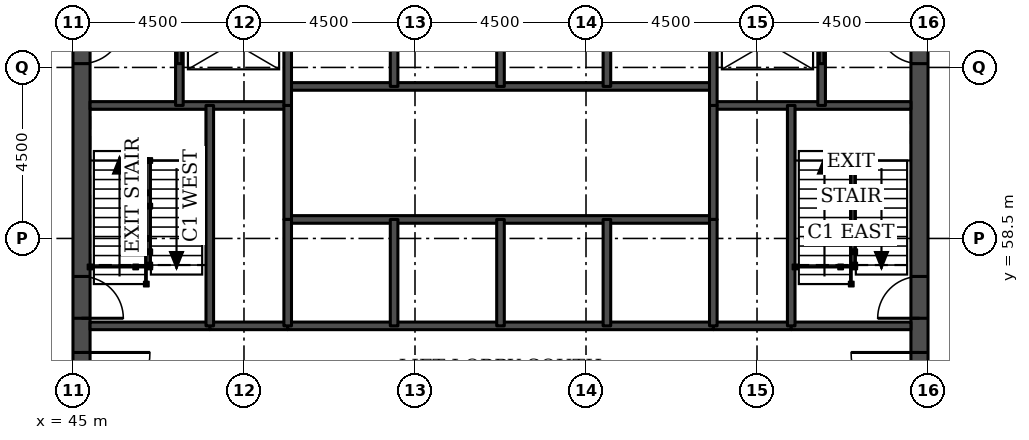
"""IFC4 building model, lengths in metres.
Left out: names, types, materials, properties, quantities, classifications, styles, units other than length and angle.
Written with IfcOpenShell. Run it as: python <this file> out.ifc"""

import sys

from ifc_helpers import new_model, si_unit, direction, frame, frame_2d, origin, place, context, subcontext, project, spatial, rectangle, extrude, element, fill, save


model = new_model("IFC4")
c1 = context("Model", 3, precision=1e-05, world=origin(), true_north=direction((0.0, 1.0)))
c2 = subcontext(c1, "Body", "Model", "MODEL_VIEW")
j1 = project(units=[si_unit("LENGTHUNIT", "METRE"), si_unit("PLANEANGLEUNIT", "RADIAN")], contexts=[c1])
p1 = place(None, origin())
s1 = spatial("IfcSite", under=j1, at=p1, CompositionType="ELEMENT")
p2 = place(p1, origin())
s2 = spatial("IfcBuilding", under=s1, at=p2, CompositionType="ELEMENT")
p3 = place(p2, frame((0.0, 0.0, 108.5)))
s3 = spatial("IfcBuildingStorey", under=s2, at=p3, CompositionType="ELEMENT", Elevation=108.5)
p4 = place(p3, frame((45.225, 49.5, 0.0), z_axis=(0.0, 0.0, 1.0), x_axis=(0.0, 1.0, 0.0)))
e1 = element("IfcWall", 1, at=p4, inside=s3, PredefinedType="SHEAR", context=c2, shape_type="SweptSolid", body=[
    extrude(rectangle(XDim=22.5, YDim=0.45, at=frame_2d((11.25, 0.0))), origin(), (0.0, 0.0, 1.0), 3.7),
])
p5 = place(p4, frame((4.2, 0.0, 0.0)))
e2 = element("IfcOpeningElement", 2, at=p5, cuts=e1, PredefinedType="OPENING", context=c2, shape_type="SweptSolid", body=[
    extrude(rectangle(XDim=1.8, YDim=2.1, at=frame_2d((0.9, 1.05))), frame((0.0, 0.235, 0.0), z_axis=(0.0, -1.0, 0.0), x_axis=(1.0, 0.0, 0.0)), (0.0, 0.0, 1.0), 0.47),
])
p6 = place(p4, frame((6.9, 0.0, 0.0)))
e3 = element("IfcOpeningElement", 3, at=p6, cuts=e1, PredefinedType="OPENING", context=c2, shape_type="SweptSolid", body=[
    extrude(rectangle(XDim=1.1, YDim=2.1, at=frame_2d((0.55, 1.05))), frame((0.0, 0.235, 0.0), z_axis=(0.0, -1.0, 0.0), x_axis=(1.0, 0.0, 0.0)), (0.0, 0.0, 1.0), 0.47),
])
p7 = place(p4, frame((13.6, 0.0, 0.0)))
e4 = element("IfcOpeningElement", 4, at=p7, cuts=e1, PredefinedType="OPENING", context=c2, shape_type="SweptSolid", body=[
    extrude(rectangle(XDim=1.1, YDim=2.1, at=frame_2d((0.55, 1.05))), frame((0.0, 0.235, 0.0), z_axis=(0.0, -1.0, 0.0), x_axis=(1.0, 0.0, 0.0)), (0.0, 0.0, 1.0), 0.47),
])
p8 = place(p4, frame((16.5, 0.0, 0.0)))
e5 = element("IfcOpeningElement", 5, at=p8, cuts=e1, PredefinedType="OPENING", context=c2, shape_type="SweptSolid", body=[
    extrude(rectangle(XDim=1.8, YDim=2.1, at=frame_2d((0.9, 1.05))), frame((0.0, 0.235, 0.0), z_axis=(0.0, -1.0, 0.0), x_axis=(1.0, 0.0, 0.0)), (0.0, 0.0, 1.0), 0.47),
])
p9 = place(p3, frame((67.275, 49.5, 0.0), z_axis=(0.0, 0.0, 1.0), x_axis=(0.0, 1.0, 0.0)))
e6 = element("IfcWall", 6, at=p9, inside=s3, PredefinedType="SHEAR", context=c2, shape_type="SweptSolid", body=[
    extrude(rectangle(XDim=22.5, YDim=0.45, at=frame_2d((11.25, 0.0))), origin(), (0.0, 0.0, 1.0), 3.7),
])
p10 = place(p9, frame((4.2, 0.0, 0.0)))
e7 = element("IfcOpeningElement", 7, at=p10, cuts=e6, PredefinedType="OPENING", context=c2, shape_type="SweptSolid", body=[
    extrude(rectangle(XDim=1.8, YDim=2.1, at=frame_2d((0.9, 1.05))), frame((0.0, 0.235, 0.0), z_axis=(0.0, -1.0, 0.0), x_axis=(1.0, 0.0, 0.0)), (0.0, 0.0, 1.0), 0.47),
])
p11 = place(p9, frame((6.9, 0.0, 0.0)))
e8 = element("IfcOpeningElement", 8, at=p11, cuts=e6, PredefinedType="OPENING", context=c2, shape_type="SweptSolid", body=[
    extrude(rectangle(XDim=1.1, YDim=2.1, at=frame_2d((0.55, 1.05))), frame((0.0, 0.235, 0.0), z_axis=(0.0, -1.0, 0.0), x_axis=(1.0, 0.0, 0.0)), (0.0, 0.0, 1.0), 0.47),
])
p12 = place(p9, frame((13.6, 0.0, 0.0)))
e9 = element("IfcOpeningElement", 9, at=p12, cuts=e6, PredefinedType="OPENING", context=c2, shape_type="SweptSolid", body=[
    extrude(rectangle(XDim=1.1, YDim=2.1, at=frame_2d((0.55, 1.05))), frame((0.0, 0.235, 0.0), z_axis=(0.0, -1.0, 0.0), x_axis=(1.0, 0.0, 0.0)), (0.0, 0.0, 1.0), 0.47),
])
p13 = place(p9, frame((16.5, 0.0, 0.0)))
e10 = element("IfcOpeningElement", 10, at=p13, cuts=e6, PredefinedType="OPENING", context=c2, shape_type="SweptSolid", body=[
    extrude(rectangle(XDim=1.8, YDim=2.1, at=frame_2d((0.9, 1.05))), frame((0.0, 0.235, 0.0), z_axis=(0.0, -1.0, 0.0), x_axis=(1.0, 0.0, 0.0)), (0.0, 0.0, 1.0), 0.47),
])
for number, where, z_axis, x_axis in (
    (11, (48.6, 56.2, 0.0), (0.0, 0.0, 1.0), (1.0, 0.0, 0.0)),
    (12, (61.85, 56.2, 0.0), (0.0, 0.0, 1.0), (1.0, 0.0, 0.0)),
):
    element("IfcWall", number, at=place(p3, frame(where, z_axis=z_axis, x_axis=x_axis)), inside=s3, PredefinedType="SOLIDWALL", context=c2, shape_type="SweptSolid", body=[
        extrude(rectangle(XDim=2.05, YDim=0.2, at=frame_2d((1.025, 0.0))), origin(), (0.0, 0.0, 1.0), 3.55),
    ])
p14 = place(p3, frame((45.45, 56.2, 0.0), z_axis=(0.0, 0.0, 1.0), x_axis=(1.0, 0.0, 0.0)))
e13 = element("IfcWall", 13, at=p14, inside=s3, PredefinedType="SOLIDWALL", context=c2, shape_type="SweptSolid", body=[
    extrude(rectangle(XDim=3.15, YDim=0.2, at=frame_2d((1.575, 0.0))), origin(), (0.0, 0.0, 1.0), 3.55),
])
p15 = place(p3, frame((50.65, 56.2, 0.0), z_axis=(0.0, 0.0, 1.0), x_axis=(1.0, 0.0, 0.0)))
e14 = element("IfcWall", 14, at=p15, inside=s3, PredefinedType="SOLIDWALL", context=c2, shape_type="SweptSolid", body=[
    extrude(rectangle(XDim=11.2, YDim=0.2, at=frame_2d((5.6, 0.0))), origin(), (0.0, 0.0, 1.0), 3.55),
])
p16 = place(p3, frame((63.9, 56.2, 0.0), z_axis=(0.0, 0.0, 1.0), x_axis=(1.0, 0.0, 0.0)))
e15 = element("IfcWall", 15, at=p16, inside=s3, PredefinedType="SOLIDWALL", context=c2, shape_type="SweptSolid", body=[
    extrude(rectangle(XDim=3.15, YDim=0.2, at=frame_2d((1.575, 0.0))), origin(), (0.0, 0.0, 1.0), 3.55),
])
p17 = place(p3, frame((50.65, 59.0, 0.0), z_axis=(0.0, 0.0, 1.0), x_axis=(1.0, 0.0, 0.0)))
e16 = element("IfcWall", 16, at=p17, inside=s3, PredefinedType="SOLIDWALL", context=c2, shape_type="SweptSolid", body=[
    extrude(rectangle(XDim=11.2, YDim=0.2, at=frame_2d((5.6, 0.0))), origin(), (0.0, 0.0, 1.0), 3.7),
])
for number, where, z_axis, x_axis in (
    (17, (45.45, 62.0, 0.0), (0.0, 0.0, 1.0), (1.0, 0.0, 0.0)),
    (18, (61.85, 62.0, 0.0), (0.0, 0.0, 1.0), (1.0, 0.0, 0.0)),
):
    element("IfcWall", number, at=place(p3, frame(where, z_axis=z_axis, x_axis=x_axis)), inside=s3, PredefinedType="SOLIDWALL", context=c2, shape_type="SweptSolid", body=[
        extrude(rectangle(XDim=5.2, YDim=0.2, at=frame_2d((2.6, 0.0))), origin(), (0.0, 0.0, 1.0), 3.55),
    ])
p18 = place(p3, frame((50.65, 62.5, 0.0), z_axis=(0.0, 0.0, 1.0), x_axis=(1.0, 0.0, 0.0)))
e19 = element("IfcWall", 19, at=p18, inside=s3, PredefinedType="SOLIDWALL", context=c2, shape_type="SweptSolid", body=[
    extrude(rectangle(XDim=11.2, YDim=0.2, at=frame_2d((5.6, 0.0))), origin(), (0.0, 0.0, 1.0), 3.7),
])
p19 = place(p3, frame((47.8, 62.0, 0.0), z_axis=(0.0, 0.0, 1.0), x_axis=(0.0, 1.0, 0.0)))
e20 = element("IfcWall", 20, at=p19, inside=s3, PredefinedType="SOLIDWALL", context=c2, shape_type="SweptSolid", body=[
    extrude(rectangle(XDim=3.3, YDim=0.2, at=frame_2d((1.65, 0.0))), origin(), (0.0, 0.0, 1.0), 3.55),
])
p20 = place(p19, frame((1.1, 0.0, 0.0)))
e21 = element("IfcOpeningElement", 21, at=p20, cuts=e20, PredefinedType="OPENING", context=c2, shape_type="SweptSolid", body=[
    extrude(rectangle(XDim=1.1, YDim=2.1, at=frame_2d((0.55, 1.05))), frame((0.0, 0.11, 0.0), z_axis=(0.0, -1.0, 0.0), x_axis=(1.0, 0.0, 0.0)), (0.0, 0.0, 1.0), 0.22),
])
p21 = place(p3, frame((48.6, 56.2, 0.0), z_axis=(0.0, 0.0, 1.0), x_axis=(0.0, 1.0, 0.0)))
e22 = element("IfcWall", 22, at=p21, inside=s3, PredefinedType="SOLIDWALL", context=c2, shape_type="SweptSolid", body=[
    extrude(rectangle(XDim=5.8, YDim=0.2, at=frame_2d((2.9, 0.0))), origin(), (0.0, 0.0, 1.0), 3.55),
])
p22 = place(p3, frame((50.65, 59.0, 0.0), z_axis=(0.0, 0.0, 1.0), x_axis=(0.0, 1.0, 0.0)))
e23 = element("IfcWall", 23, at=p22, inside=s3, PredefinedType="SOLIDWALL", context=c2, shape_type="SweptSolid", body=[
    extrude(rectangle(XDim=3.0, YDim=0.2, at=frame_2d((1.5, 0.0))), origin(), (0.0, 0.0, 1.0), 3.7),
])
p23 = place(p3, frame((50.65, 56.2, 0.0), z_axis=(0.0, 0.0, 1.0), x_axis=(0.0, 1.0, 0.0)))
e24 = element("IfcWall", 24, at=p23, inside=s3, PredefinedType="SOLIDWALL", context=c2, shape_type="SweptSolid", body=[
    extrude(rectangle(XDim=2.8, YDim=0.2, at=frame_2d((1.4, 0.0))), origin(), (0.0, 0.0, 1.0), 3.55),
])
p24 = place(p3, frame((50.65, 62.0, 0.0), z_axis=(0.0, 0.0, 1.0), x_axis=(0.0, 1.0, 0.0)))
e25 = element("IfcWall", 25, at=p24, inside=s3, PredefinedType="SOLIDWALL", context=c2, shape_type="SweptSolid", body=[
    extrude(rectangle(XDim=3.3, YDim=0.2, at=frame_2d((1.65, 0.0))), origin(), (0.0, 0.0, 1.0), 3.55),
])
for number, where, z_axis, x_axis in (
    (26, (53.45, 56.2, 0.0), (0.0, 0.0, 1.0), (0.0, 1.0, 0.0)),
    (27, (53.45, 62.5, 0.0), (0.0, 0.0, 1.0), (0.0, 1.0, 0.0)),
    (28, (56.25, 56.2, 0.0), (0.0, 0.0, 1.0), (0.0, 1.0, 0.0)),
    (29, (56.25, 62.5, 0.0), (0.0, 0.0, 1.0), (0.0, 1.0, 0.0)),
    (30, (59.05, 56.2, 0.0), (0.0, 0.0, 1.0), (0.0, 1.0, 0.0)),
    (31, (59.05, 62.5, 0.0), (0.0, 0.0, 1.0), (0.0, 1.0, 0.0)),
):
    element("IfcWall", number, at=place(p3, frame(where, z_axis=z_axis, x_axis=x_axis)), inside=s3, PredefinedType="SOLIDWALL", context=c2, shape_type="SweptSolid", body=[
        extrude(rectangle(XDim=2.8, YDim=0.2, at=frame_2d((1.4, 0.0))), origin(), (0.0, 0.0, 1.0), 3.55),
    ])
p25 = place(p3, frame((61.85, 59.0, 0.0), z_axis=(0.0, 0.0, 1.0), x_axis=(0.0, 1.0, 0.0)))
e32 = element("IfcWall", 32, at=p25, inside=s3, PredefinedType="SOLIDWALL", context=c2, shape_type="SweptSolid", body=[
    extrude(rectangle(XDim=3.0, YDim=0.2, at=frame_2d((1.5, 0.0))), origin(), (0.0, 0.0, 1.0), 3.7),
])
p26 = place(p3, frame((61.85, 56.2, 0.0), z_axis=(0.0, 0.0, 1.0), x_axis=(0.0, 1.0, 0.0)))
e33 = element("IfcWall", 33, at=p26, inside=s3, PredefinedType="SOLIDWALL", context=c2, shape_type="SweptSolid", body=[
    extrude(rectangle(XDim=2.8, YDim=0.2, at=frame_2d((1.4, 0.0))), origin(), (0.0, 0.0, 1.0), 3.55),
])
p27 = place(p3, frame((61.85, 62.0, 0.0), z_axis=(0.0, 0.0, 1.0), x_axis=(0.0, 1.0, 0.0)))
e34 = element("IfcWall", 34, at=p27, inside=s3, PredefinedType="SOLIDWALL", context=c2, shape_type="SweptSolid", body=[
    extrude(rectangle(XDim=3.3, YDim=0.2, at=frame_2d((1.65, 0.0))), origin(), (0.0, 0.0, 1.0), 3.55),
])
p28 = place(p3, frame((63.9, 56.2, 0.0), z_axis=(0.0, 0.0, 1.0), x_axis=(0.0, 1.0, 0.0)))
e35 = element("IfcWall", 35, at=p28, inside=s3, PredefinedType="SOLIDWALL", context=c2, shape_type="SweptSolid", body=[
    extrude(rectangle(XDim=5.8, YDim=0.2, at=frame_2d((2.9, 0.0))), origin(), (0.0, 0.0, 1.0), 3.55),
])
p29 = place(p3, frame((64.7, 62.0, 0.0), z_axis=(0.0, 0.0, 1.0), x_axis=(0.0, 1.0, 0.0)))
e36 = element("IfcWall", 36, at=p29, inside=s3, PredefinedType="SOLIDWALL", context=c2, shape_type="SweptSolid", body=[
    extrude(rectangle(XDim=3.3, YDim=0.2, at=frame_2d((1.65, 0.0))), origin(), (0.0, 0.0, 1.0), 3.55),
])
p30 = place(p29, frame((1.1, 0.0, 0.0)))
e37 = element("IfcOpeningElement", 37, at=p30, cuts=e36, PredefinedType="OPENING", context=c2, shape_type="SweptSolid", body=[
    extrude(rectangle(XDim=1.1, YDim=2.1, at=frame_2d((0.55, 1.05))), frame((0.0, 0.11, 0.0), z_axis=(0.0, -1.0, 0.0), x_axis=(1.0, 0.0, 0.0)), (0.0, 0.0, 1.0), 0.22),
])
p31 = place(p20, origin())
e38 = element("IfcDoor", 38, at=p31, inside=s3, OperationType="DOUBLE_DOOR_SLIDING", PredefinedType="DOOR", context=c2, shape_type="SweptSolid", body=[
    extrude(rectangle(XDim=1.1, YDim=2.1, at=frame_2d((0.55, 1.05))), frame((0.0, 0.025, 0.0), z_axis=(0.0, -1.0, 0.0), x_axis=(1.0, 0.0, 0.0)), (0.0, 0.0, 1.0), 0.05),
])
fill(e21, e38)
p32 = place(p30, origin())
e39 = element("IfcDoor", 39, at=p32, inside=s3, OperationType="DOUBLE_DOOR_SLIDING", PredefinedType="DOOR", context=c2, shape_type="SweptSolid", body=[
    extrude(rectangle(XDim=1.1, YDim=2.1, at=frame_2d((0.55, 1.05))), frame((0.0, 0.025, 0.0), z_axis=(0.0, -1.0, 0.0), x_axis=(1.0, 0.0, 0.0)), (0.0, 0.0, 1.0), 0.05),
])
fill(e37, e39)
p33 = place(p5, frame((1.8, 0.0, 0.0), z_axis=(0.0, 0.0, 1.0), x_axis=(-1.0, 0.0, 0.0)))
e40 = element("IfcDoor", 40, at=p33, inside=s3, OperationType="SINGLE_SWING_LEFT", PredefinedType="DOOR", context=c2, shape_type="SweptSolid", body=[
    extrude(rectangle(XDim=1.8, YDim=2.1, at=frame_2d((0.9, 1.05))), frame((0.0, 0.025, 0.0), z_axis=(0.0, -1.0, 0.0), x_axis=(1.0, 0.0, 0.0)), (0.0, 0.0, 1.0), 0.05),
])
fill(e2, e40)
p34 = place(p6, frame((1.1, 0.0, 0.0), z_axis=(0.0, 0.0, 1.0), x_axis=(-1.0, 0.0, 0.0)))
e41 = element("IfcDoor", 41, at=p34, inside=s3, OperationType="SINGLE_SWING_RIGHT", PredefinedType="DOOR", context=c2, shape_type="SweptSolid", body=[
    extrude(rectangle(XDim=1.1, YDim=2.1, at=frame_2d((0.55, 1.05))), frame((0.0, 0.025, 0.0), z_axis=(0.0, -1.0, 0.0), x_axis=(1.0, 0.0, 0.0)), (0.0, 0.0, 1.0), 0.05),
])
fill(e3, e41)
p35 = place(p7, frame((1.1, 0.0, 0.0), z_axis=(0.0, 0.0, 1.0), x_axis=(-1.0, 0.0, 0.0)))
e42 = element("IfcDoor", 42, at=p35, inside=s3, OperationType="SINGLE_SWING_LEFT", PredefinedType="DOOR", context=c2, shape_type="SweptSolid", body=[
    extrude(rectangle(XDim=1.1, YDim=2.1, at=frame_2d((0.55, 1.05))), frame((0.0, 0.025, 0.0), z_axis=(0.0, -1.0, 0.0), x_axis=(1.0, 0.0, 0.0)), (0.0, 0.0, 1.0), 0.05),
])
fill(e4, e42)
p36 = place(p10, origin())
e43 = element("IfcDoor", 43, at=p36, inside=s3, OperationType="SINGLE_SWING_RIGHT", PredefinedType="DOOR", context=c2, shape_type="SweptSolid", body=[
    extrude(rectangle(XDim=1.8, YDim=2.1, at=frame_2d((0.9, 1.05))), frame((0.0, 0.025, 0.0), z_axis=(0.0, -1.0, 0.0), x_axis=(1.0, 0.0, 0.0)), (0.0, 0.0, 1.0), 0.05),
])
fill(e7, e43)
p37 = place(p11, origin())
e44 = element("IfcDoor", 44, at=p37, inside=s3, OperationType="SINGLE_SWING_LEFT", PredefinedType="DOOR", context=c2, shape_type="SweptSolid", body=[
    extrude(rectangle(XDim=1.1, YDim=2.1, at=frame_2d((0.55, 1.05))), frame((0.0, 0.025, 0.0), z_axis=(0.0, -1.0, 0.0), x_axis=(1.0, 0.0, 0.0)), (0.0, 0.0, 1.0), 0.05),
])
fill(e8, e44)
p38 = place(p12, origin())
e45 = element("IfcDoor", 45, at=p38, inside=s3, OperationType="SINGLE_SWING_RIGHT", PredefinedType="DOOR", context=c2, shape_type="SweptSolid", body=[
    extrude(rectangle(XDim=1.1, YDim=2.1, at=frame_2d((0.55, 1.05))), frame((0.0, 0.025, 0.0), z_axis=(0.0, -1.0, 0.0), x_axis=(1.0, 0.0, 0.0)), (0.0, 0.0, 1.0), 0.05),
])
fill(e9, e45)
save(model, sys.argv[1])
